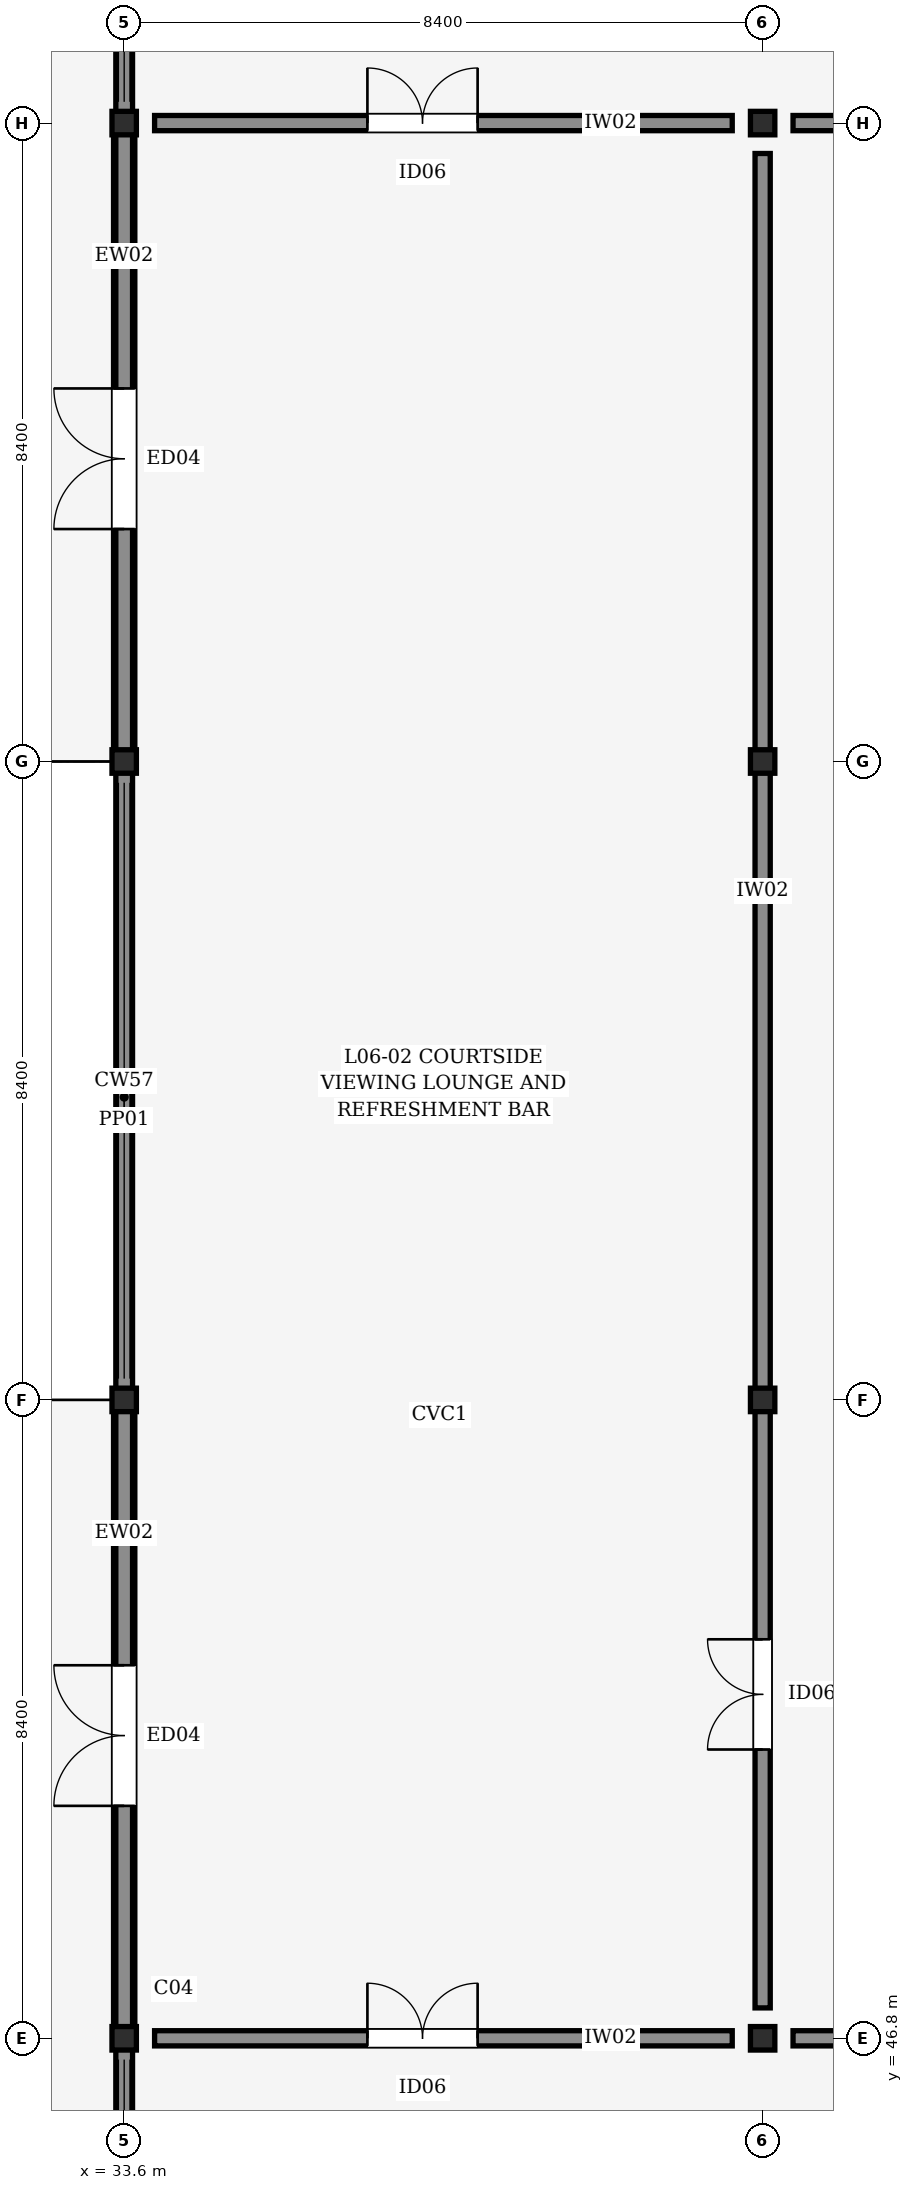
"""IFC4 building model, lengths in metres.
Left out: names, types, materials, properties, quantities, classifications, styles, units other than length and angle.
Written with IfcOpenShell. Run it as: python <this file> out.ifc"""

import sys

from ifc_helpers import new_model, si_unit, direction, frame, frame_2d, origin, origin_2d, place, context, subcontext, project, spatial, rectangle, i_section, extrude, element, fill, save


model = new_model("IFC4")
c1 = context("Model", 3, precision=1e-05, world=origin(), true_north=direction((0.0, 1.0)))
c2 = subcontext(c1, "Body", "Model", "MODEL_VIEW")
j1 = project(units=[si_unit("LENGTHUNIT", "METRE"), si_unit("PLANEANGLEUNIT", "RADIAN")], contexts=[c1])
p1 = place(None, origin())
s1 = spatial("IfcSite", under=j1, at=p1, CompositionType="ELEMENT")
p2 = place(p1, origin())
s2 = spatial("IfcBuilding", under=s1, at=p2, CompositionType="ELEMENT")
p3 = place(p2, frame((0.0, 0.0, 23.4)))
s3 = spatial("IfcBuildingStorey", under=s2, at=p3, CompositionType="ELEMENT", Elevation=23.4)
for number, where, z_axis, x_axis in (
    (1, (33.6, 46.8, 0.0), (0.0, 0.0, 1.0), (1.0, 0.0, 0.0)),
    (2, (33.6, 55.2, 0.0), (0.0, 0.0, 1.0), (1.0, 0.0, 0.0)),
    (3, (33.6, 63.6, 0.0), (0.0, 0.0, 1.0), (1.0, 0.0, 0.0)),
    (4, (33.6, 72.0, 0.0), (0.0, 0.0, 1.0), (1.0, 0.0, 0.0)),
    (5, (42.0, 46.8, 0.0), (0.0, 0.0, 1.0), (1.0, 0.0, 0.0)),
    (6, (42.0, 55.2, 0.0), (0.0, 0.0, 1.0), (1.0, 0.0, 0.0)),
    (7, (42.0, 63.6, 0.0), (0.0, 0.0, 1.0), (1.0, 0.0, 0.0)),
    (8, (42.0, 72.0, 0.0), (0.0, 0.0, 1.0), (1.0, 0.0, 0.0)),
):
    element("IfcColumn", number, at=place(p3, frame(where, z_axis=z_axis, x_axis=x_axis)), inside=s3, PredefinedType="COLUMN", context=c2, shape_type="SweptSolid", body=[
        extrude(i_section(OverallWidth=0.309, OverallDepth=0.321, WebThickness=0.014, FlangeThickness=0.022, FilletRadius=0.015, at=origin_2d()), origin(), (0.0, 0.0, 1.0), 5.4),
    ])
p4 = place(p3, frame((33.6, 46.958, 0.0), z_axis=(0.0, 0.0, 1.0), x_axis=(0.0, 1.0, 0.0)))
e9 = element("IfcWall", 9, at=p4, inside=s3, PredefinedType="STANDARD", context=c2, shape_type="SweptSolid", body=[
    extrude(rectangle(XDim=8.083, YDim=0.28, at=frame_2d((4.042, 0.0))), origin(), (0.0, 0.0, 1.0), 3.795),
])
p5 = place(p4, frame((2.9, 0.0, 0.0)))
e10 = element("IfcOpeningElement", 10, at=p5, cuts=e9, PredefinedType="OPENING", context=c2, shape_type="SweptSolid", body=[
    extrude(rectangle(XDim=1.85, YDim=2.3, at=frame_2d((0.925, 1.15))), frame((0.0, 0.15, 0.0), z_axis=(0.0, -1.0, 0.0), x_axis=(1.0, 0.0, 0.0)), (0.0, 0.0, 1.0), 0.3),
])
p6 = place(p3, frame((33.6, 63.759, 0.0), z_axis=(0.0, 0.0, 1.0), x_axis=(0.0, 1.0, 0.0)))
e11 = element("IfcWall", 11, at=p6, inside=s3, PredefinedType="STANDARD", context=c2, shape_type="SweptSolid", body=[
    extrude(rectangle(XDim=8.083, YDim=0.28, at=frame_2d((4.042, 0.0))), origin(), (0.0, 0.0, 1.0), 3.795),
])
p7 = place(p6, frame((2.9, 0.0, 0.0)))
e12 = element("IfcOpeningElement", 12, at=p7, cuts=e11, PredefinedType="OPENING", context=c2, shape_type="SweptSolid", body=[
    extrude(rectangle(XDim=1.85, YDim=2.3, at=frame_2d((0.925, 1.15))), frame((0.0, 0.15, 0.0), z_axis=(0.0, -1.0, 0.0), x_axis=(1.0, 0.0, 0.0)), (0.0, 0.0, 1.0), 0.3),
])
p8 = place(p3, frame((33.6, 38.515, 5.4), z_axis=(0.0, 0.0, 1.0), x_axis=(0.0, 1.0, 0.0)))
e13 = element("IfcWall", 13, at=p8, inside=s3, PredefinedType="PARAPET", context=c2, shape_type="SweptSolid", body=[
    extrude(rectangle(XDim=41.77, YDim=0.22, at=frame_2d((20.885, 0.0))), origin(), (0.0, 0.0, 1.0), 1.15),
])
p9 = place(p3, frame((42.0, 47.2, 0.0), z_axis=(0.0, 0.0, 1.0), x_axis=(0.0, 1.0, 0.0)))
e14 = element("IfcWall", 14, at=p9, inside=s3, PredefinedType="PARTITIONING", context=c2, shape_type="SweptSolid", body=[
    extrude(rectangle(XDim=24.4, YDim=0.2, at=frame_2d((12.2, 0.0))), origin(), (0.0, 0.0, 1.0), 3.785),
])
p10 = place(p9, frame((3.4, 0.0, 0.0)))
e15 = element("IfcOpeningElement", 15, at=p10, cuts=e14, PredefinedType="OPENING", context=c2, shape_type="SweptSolid", body=[
    extrude(rectangle(XDim=1.45, YDim=2.2, at=frame_2d((0.725, 1.1))), frame((0.0, 0.11, 0.0), z_axis=(0.0, -1.0, 0.0), x_axis=(1.0, 0.0, 0.0)), (0.0, 0.0, 1.0), 0.22),
])
p11 = place(p3, frame((34.0, 46.8, 0.0), z_axis=(0.0, 0.0, 1.0), x_axis=(1.0, 0.0, 0.0)))
e16 = element("IfcWall", 16, at=p11, inside=s3, PredefinedType="PARTITIONING", context=c2, shape_type="SweptSolid", body=[
    extrude(rectangle(XDim=7.6, YDim=0.2, at=frame_2d((3.8, 0.0))), origin(), (0.0, 0.0, 1.0), 3.785),
])
p12 = place(p11, frame((2.8, 0.0, 0.0)))
e17 = element("IfcOpeningElement", 17, at=p12, cuts=e16, PredefinedType="OPENING", context=c2, shape_type="SweptSolid", body=[
    extrude(rectangle(XDim=1.45, YDim=2.2, at=frame_2d((0.725, 1.1))), frame((0.0, 0.11, 0.0), z_axis=(0.0, -1.0, 0.0), x_axis=(1.0, 0.0, 0.0)), (0.0, 0.0, 1.0), 0.22),
])
p13 = place(p3, frame((42.4, 46.8, 0.0), z_axis=(0.0, 0.0, 1.0), x_axis=(1.0, 0.0, 0.0)))
e18 = element("IfcWall", 18, at=p13, inside=s3, PredefinedType="PARTITIONING", context=c2, shape_type="SweptSolid", body=[
    extrude(rectangle(XDim=16.2, YDim=0.2, at=frame_2d((8.1, 0.0))), origin(), (0.0, 0.0, 1.0), 3.785),
])
p14 = place(p13, frame((3.4, 0.0, 0.0)))
e19 = element("IfcOpeningElement", 19, at=p14, cuts=e18, PredefinedType="OPENING", context=c2, shape_type="SweptSolid", body=[
    extrude(rectangle(XDim=1.45, YDim=2.2, at=frame_2d((0.725, 1.1))), frame((0.0, 0.11, 0.0), z_axis=(0.0, -1.0, 0.0), x_axis=(1.0, 0.0, 0.0)), (0.0, 0.0, 1.0), 0.22),
])
p15 = place(p3, frame((34.0, 72.0, 0.0), z_axis=(0.0, 0.0, 1.0), x_axis=(1.0, 0.0, 0.0)))
e20 = element("IfcWall", 20, at=p15, inside=s3, PredefinedType="PARTITIONING", context=c2, shape_type="SweptSolid", body=[
    extrude(rectangle(XDim=7.6, YDim=0.2, at=frame_2d((3.8, 0.0))), origin(), (0.0, 0.0, 1.0), 3.785),
])
p16 = place(p15, frame((2.8, 0.0, 0.0)))
e21 = element("IfcOpeningElement", 21, at=p16, cuts=e20, PredefinedType="OPENING", context=c2, shape_type="SweptSolid", body=[
    extrude(rectangle(XDim=1.45, YDim=2.2, at=frame_2d((0.725, 1.1))), frame((0.0, 0.11, 0.0), z_axis=(0.0, -1.0, 0.0), x_axis=(1.0, 0.0, 0.0)), (0.0, 0.0, 1.0), 0.22),
])
p17 = place(p3, frame((42.4, 72.0, 0.0), z_axis=(0.0, 0.0, 1.0), x_axis=(1.0, 0.0, 0.0)))
e22 = element("IfcWall", 22, at=p17, inside=s3, PredefinedType="PARTITIONING", context=c2, shape_type="SweptSolid", body=[
    extrude(rectangle(XDim=41.2, YDim=0.2, at=frame_2d((20.6, 0.0))), origin(), (0.0, 0.0, 1.0), 3.785),
])
p18 = place(p17, frame((3.4, 0.0, 0.0)))
e23 = element("IfcOpeningElement", 23, at=p18, cuts=e22, PredefinedType="OPENING", context=c2, shape_type="SweptSolid", body=[
    extrude(rectangle(XDim=1.45, YDim=2.2, at=frame_2d((0.725, 1.1))), frame((0.0, 0.11, 0.0), z_axis=(0.0, -1.0, 0.0), x_axis=(1.0, 0.0, 0.0)), (0.0, 0.0, 1.0), 0.22),
])
p19 = place(p5, origin())
e24 = element("IfcDoor", 24, at=p19, inside=s3, OperationType="DOUBLE_DOOR_SINGLE_SWING", PredefinedType="DOOR", context=c2, shape_type="SweptSolid", body=[
    extrude(rectangle(XDim=1.85, YDim=2.3, at=frame_2d((0.925, 1.15))), frame((0.0, 0.025, 0.0), z_axis=(0.0, -1.0, 0.0), x_axis=(1.0, 0.0, 0.0)), (0.0, 0.0, 1.0), 0.05),
])
fill(e10, e24)
p20 = place(p7, origin())
e25 = element("IfcDoor", 25, at=p20, inside=s3, OperationType="DOUBLE_DOOR_SINGLE_SWING", PredefinedType="DOOR", context=c2, shape_type="SweptSolid", body=[
    extrude(rectangle(XDim=1.85, YDim=2.3, at=frame_2d((0.925, 1.15))), frame((0.0, 0.025, 0.0), z_axis=(0.0, -1.0, 0.0), x_axis=(1.0, 0.0, 0.0)), (0.0, 0.0, 1.0), 0.05),
])
fill(e12, e25)
p21 = place(p10, origin())
e26 = element("IfcDoor", 26, at=p21, inside=s3, OperationType="DOUBLE_DOOR_SINGLE_SWING", PredefinedType="DOOR", context=c2, shape_type="SweptSolid", body=[
    extrude(rectangle(XDim=1.45, YDim=2.2, at=frame_2d((0.725, 1.1))), frame((0.0, 0.025, 0.0), z_axis=(0.0, -1.0, 0.0), x_axis=(1.0, 0.0, 0.0)), (0.0, 0.0, 1.0), 0.05),
])
fill(e15, e26)
p22 = place(p12, origin())
e27 = element("IfcDoor", 27, at=p22, inside=s3, OperationType="DOUBLE_DOOR_SINGLE_SWING", PredefinedType="DOOR", context=c2, shape_type="SweptSolid", body=[
    extrude(rectangle(XDim=1.45, YDim=2.2, at=frame_2d((0.725, 1.1))), frame((0.0, 0.025, 0.0), z_axis=(0.0, -1.0, 0.0), x_axis=(1.0, 0.0, 0.0)), (0.0, 0.0, 1.0), 0.05),
])
fill(e17, e27)
p23 = place(p16, origin())
e28 = element("IfcDoor", 28, at=p23, inside=s3, OperationType="DOUBLE_DOOR_SINGLE_SWING", PredefinedType="DOOR", context=c2, shape_type="SweptSolid", body=[
    extrude(rectangle(XDim=1.45, YDim=2.2, at=frame_2d((0.725, 1.1))), frame((0.0, 0.025, 0.0), z_axis=(0.0, -1.0, 0.0), x_axis=(1.0, 0.0, 0.0)), (0.0, 0.0, 1.0), 0.05),
])
fill(e21, e28)
save(model, sys.argv[1])
